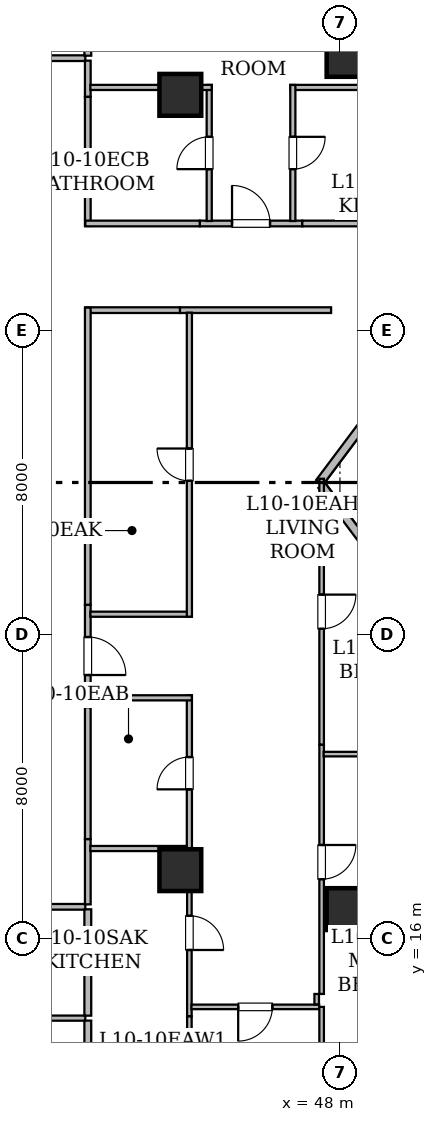
"""IFC4 building model, lengths in metres.
Left out: names, types, materials, properties, quantities, classifications, styles, units other than length and angle.
Written with IfcOpenShell. Run it as: python <this file> out.ifc"""

import sys

from ifc_helpers import new_model, si_unit, direction, frame, frame_2d, origin, origin_2d, place, context, subcontext, project, spatial, rectangle, hollow_rectangle, extrude, element, fill, save


model = new_model("IFC4")
c1 = context("Model", 3, precision=1e-05, world=origin(), true_north=direction((0.0, 1.0)))
c2 = subcontext(c1, "Body", "Model", "MODEL_VIEW")
j1 = project(units=[si_unit("LENGTHUNIT", "METRE"), si_unit("PLANEANGLEUNIT", "RADIAN")], contexts=[c1])
p1 = place(None, origin())
s1 = spatial("IfcSite", under=j1, at=p1, CompositionType="ELEMENT")
p2 = place(p1, origin())
s2 = spatial("IfcBuilding", under=s1, at=p2, CompositionType="ELEMENT")
p3 = place(p2, frame((0.0, 0.0, 44.25)))
s3 = spatial("IfcBuildingStorey", under=s2, at=p3, CompositionType="ELEMENT", Elevation=44.25)
for number, where, z_axis, x_axis in (
    (1, (48.2, 16.775, 0.0), (0.0, 0.0, 1.0), (1.0, 0.0, 0.0)),
    (2, (48.2, 39.225, 0.0), (0.0, 0.0, 1.0), (1.0, 0.0, 0.0)),
    (3, (43.8, 17.8, 0.0), (0.0, 0.0, 1.0), (1.0, 0.0, 0.0)),
    (4, (43.8, 38.2, 0.0), (0.0, 0.0, 1.0), (1.0, 0.0, 0.0)),
):
    element("IfcColumn", number, at=place(p3, frame(where, z_axis=z_axis, x_axis=x_axis)), inside=s3, PredefinedType="COLUMN", context=c2, shape_type="SweptSolid", body=[
        extrude(hollow_rectangle(XDim=1.1, YDim=1.1, WallThickness=0.055, at=origin_2d()), origin(), (0.0, 0.0, 1.0), 3.65),
    ])
p4 = place(p3, frame((49.856, 31.191, 0.0), z_axis=(0.0, 0.0, 1.0), x_axis=(-0.600137081448, -0.799897170561, 0.0)))
e5 = element("IfcWall", 5, at=p4, inside=s3, PredefinedType="STANDARD", context=c2, shape_type="SweptSolid", body=[
    extrude(rectangle(XDim=3.989, YDim=0.22, at=frame_2d((1.995, 0.0))), origin(), (0.0, 0.0, 1.0), 3.43),
])
p5 = place(p3, frame((47.519, 27.923, 0.0), z_axis=(0.0, 0.0, 1.0), x_axis=(0.600118645218, -0.799911002338, 0.0)))
e6 = element("IfcWall", 6, at=p5, inside=s3, PredefinedType="STANDARD", context=c2, shape_type="SweptSolid", body=[
    extrude(rectangle(XDim=3.951, YDim=0.22, at=frame_2d((1.975, 0.0))), origin(), (0.0, 0.0, 1.0), 3.43),
])
p6 = place(p3, frame((41.3, 16.835, 0.0), z_axis=(0.0, 0.0, 1.0), x_axis=(-1.0, 0.0, 0.0)))
e7 = element("IfcWall", 7, at=p6, inside=s3, PredefinedType="STANDARD", context=c2, shape_type="SweptSolid", body=[
    extrude(rectangle(XDim=2.336, YDim=0.15, at=frame_2d((1.168, 0.0))), origin(), (0.0, 0.0, 1.0), 3.43),
])
p7 = place(p3, frame((34.299, 39.165, 0.0), z_axis=(0.0, 0.0, 1.0), x_axis=(1.0, 0.0, 0.0)))
e8 = element("IfcWall", 8, at=p7, inside=s3, PredefinedType="STANDARD", context=c2, shape_type="SweptSolid", body=[
    extrude(rectangle(XDim=7.001, YDim=0.15, at=frame_2d((3.5, 0.0))), origin(), (0.0, 0.0, 1.0), 3.43),
])
p8 = place(p3, frame((41.365, 18.618, 0.0), z_axis=(0.0, 0.0, 1.0), x_axis=(0.0, -1.0, 0.0)))
e9 = element("IfcWall", 9, at=p8, inside=s3, PredefinedType="STANDARD", context=c2, shape_type="SweptSolid", body=[
    extrude(rectangle(XDim=1.718, YDim=0.15, at=frame_2d((0.859, 0.0))), origin(), (0.0, 0.0, 1.0), 2.647),
])
p9 = place(p3, frame((47.767, 32.535, 0.0), z_axis=(0.0, 0.0, 1.0), x_axis=(-1.0, 0.0, 0.0)))
e10 = element("IfcWall", 10, at=p9, inside=s3, PredefinedType="STANDARD", context=c2, shape_type="SweptSolid", body=[
    extrude(rectangle(XDim=3.978, YDim=0.15, at=frame_2d((1.989, 0.0))), origin(), (0.0, 0.0, 1.0), 2.647),
])
p10 = place(p3, frame((41.365, 24.783, 0.0), z_axis=(0.0, 0.0, 1.0), x_axis=(0.0, -1.0, 0.0)))
e11 = element("IfcWall", 11, at=p10, inside=s3, PredefinedType="STANDARD", context=c2, shape_type="SweptSolid", body=[
    extrude(rectangle(XDim=2.698, YDim=0.15, at=frame_2d((1.349, 0.0))), origin(), (0.0, 0.0, 1.0), 2.957),
])
p11 = place(p10, frame((0.849, 0.0, 0.0)))
e12 = element("IfcOpeningElement", 12, at=p11, cuts=e11, PredefinedType="OPENING", context=c2, shape_type="SweptSolid", body=[
    extrude(rectangle(XDim=1.0, YDim=2.15, at=frame_2d((0.5, 1.075))), frame((0.0, 0.085, 0.0), z_axis=(0.0, -1.0, 0.0), x_axis=(1.0, 0.0, 0.0)), (0.0, 0.0, 1.0), 0.17),
])
p12 = place(p3, frame((41.365, 22.085, 0.0), z_axis=(0.0, 0.0, 1.0), x_axis=(0.0, -1.0, 0.0)))
e13 = element("IfcWall", 13, at=p12, inside=s3, PredefinedType="STANDARD", context=c2, shape_type="SweptSolid", body=[
    extrude(rectangle(XDim=3.467, YDim=0.15, at=frame_2d((1.733, 0.0))), origin(), (0.0, 0.0, 1.0), 2.647),
])
p13 = place(p3, frame((43.789, 32.535, 0.0), z_axis=(0.0, 0.0, 1.0), x_axis=(-1.0, 0.0, 0.0)))
e14 = element("IfcWall", 14, at=p13, inside=s3, PredefinedType="STANDARD", context=c2, shape_type="SweptSolid", body=[
    extrude(rectangle(XDim=2.489, YDim=0.15, at=frame_2d((1.245, 0.0))), origin(), (0.0, 0.0, 1.0), 2.647),
])
p14 = place(p3, frame((41.365, 32.6, 0.0), z_axis=(0.0, 0.0, 1.0), x_axis=(0.0, -1.0, 0.0)))
e15 = element("IfcWall", 15, at=p14, inside=s3, PredefinedType="STANDARD", context=c2, shape_type="SweptSolid", body=[
    extrude(rectangle(XDim=7.817, YDim=0.15, at=frame_2d((3.909, 0.0))), origin(), (0.0, 0.0, 1.0), 3.43),
])
p15 = place(p3, frame((41.365, 39.1, 0.0), z_axis=(0.0, 0.0, 1.0), x_axis=(0.0, -1.0, 0.0)))
e16 = element("IfcWall", 16, at=p15, inside=s3, PredefinedType="STANDARD", context=c2, shape_type="SweptSolid", body=[
    extrude(rectangle(XDim=0.954, YDim=0.15, at=frame_2d((0.477, 0.0))), origin(), (0.0, 0.0, 1.0), 3.43),
])
p16 = place(p3, frame((44.311, 34.815, 0.0), z_axis=(0.0, 0.0, 1.0), x_axis=(1.0, 0.0, 0.0)))
e17 = element("IfcWall", 17, at=p16, inside=s3, PredefinedType="STANDARD", context=c2, shape_type="SweptSolid", body=[
    extrude(rectangle(XDim=2.698, YDim=0.15, at=frame_2d((1.349, 0.0))), origin(), (0.0, 0.0, 1.0), 3.43),
])
p17 = place(p16, frame((0.849, 0.0, 0.0)))
e18 = element("IfcOpeningElement", 18, at=p17, cuts=e17, PredefinedType="OPENING", context=c2, shape_type="SweptSolid", body=[
    extrude(rectangle(XDim=1.0, YDim=2.15, at=frame_2d((0.5, 1.075))), frame((0.0, 0.085, 0.0), z_axis=(0.0, -1.0, 0.0), x_axis=(1.0, 0.0, 0.0)), (0.0, 0.0, 1.0), 0.17),
])
p18 = place(p3, frame((41.365, 38.146, 0.0), z_axis=(0.0, 0.0, 1.0), x_axis=(0.0, -1.0, 0.0)))
e19 = element("IfcWall", 19, at=p18, inside=s3, PredefinedType="STANDARD", context=c2, shape_type="SweptSolid", body=[
    extrude(rectangle(XDim=3.396, YDim=0.15, at=frame_2d((1.698, 0.0))), origin(), (0.0, 0.0, 1.0), 2.647),
])
p19 = place(p3, frame((41.3, 34.815, 0.0), z_axis=(0.0, 0.0, 1.0), x_axis=(1.0, 0.0, 0.0)))
e20 = element("IfcWall", 20, at=p19, inside=s3, PredefinedType="STANDARD", context=c2, shape_type="SweptSolid", body=[
    extrude(rectangle(XDim=3.011, YDim=0.15, at=frame_2d((1.505, 0.0))), origin(), (0.0, 0.0, 1.0), 2.647),
])
p20 = place(p3, frame((47.009, 34.815, 0.0), z_axis=(0.0, 0.0, 1.0), x_axis=(1.0, 0.0, 0.0)))
e21 = element("IfcWall", 21, at=p20, inside=s3, PredefinedType="STANDARD", context=c2, shape_type="SweptSolid", body=[
    extrude(rectangle(XDim=2.779, YDim=0.15, at=frame_2d((1.39, 0.0))), origin(), (0.0, 0.0, 1.0), 2.803),
])
p21 = place(p3, frame((38.65, 13.906, 0.0), z_axis=(0.0, 0.0, 1.0), x_axis=(1.0, 0.0, 0.0)))
e22 = element("IfcWall", 22, at=p21, inside=s3, PredefinedType="PARTITIONING", context=c2, shape_type="SweptSolid", body=[
    extrude(rectangle(XDim=2.65, YDim=0.135, at=frame_2d((1.325, 0.0))), origin(), (0.0, 0.0, 1.0), 3.43),
])
p22 = place(p3, frame((41.365, 13.841, 0.0), z_axis=(0.0, 0.0, 1.0), x_axis=(0.0, -1.0, 0.0)))
e23 = element("IfcWall", 23, at=p22, inside=s3, PredefinedType="STANDARD", context=c2, shape_type="SweptSolid", body=[
    extrude(rectangle(XDim=1.45, YDim=0.18, at=frame_2d((0.725, 0.0))), origin(), (0.0, 0.0, 1.0), 3.43),
])
p23 = place(p3, frame((41.365, 16.77, 0.0), z_axis=(0.0, 0.0, 1.0), x_axis=(0.0, -1.0, 0.0)))
e24 = element("IfcWall", 24, at=p23, inside=s3, PredefinedType="STANDARD", context=c2, shape_type="SweptSolid", body=[
    extrude(rectangle(XDim=2.799, YDim=0.18, at=frame_2d((1.399, 0.0))), origin(), (0.0, 0.0, 1.0), 3.43),
])
p24 = place(p3, frame((41.365, 41.024, 0.0), z_axis=(0.0, 0.0, 1.0), x_axis=(0.0, -1.0, 0.0)))
e25 = element("IfcWall", 25, at=p24, inside=s3, PredefinedType="STANDARD", context=c2, shape_type="SweptSolid", body=[
    extrude(rectangle(XDim=1.794, YDim=0.18, at=frame_2d((0.897, 0.0))), origin(), (0.0, 0.0, 1.0), 3.43),
])
p25 = place(p3, frame((44.038, 18.304, 0.0), z_axis=(0.0, 0.0, 1.0), x_axis=(0.0, -1.0, 0.0)))
e26 = element("IfcWall", 26, at=p25, inside=s3, PredefinedType="PARTITIONING", context=c2, shape_type="SweptSolid", body=[
    extrude(rectangle(XDim=4.351, YDim=0.12, at=frame_2d((2.176, 0.0))), origin(), (0.0, 0.0, 1.0), 2.647),
])
p26 = place(p25, frame((1.705, 0.0, 0.0)))
e27 = element("IfcOpeningElement", 27, at=p26, cuts=e26, PredefinedType="OPENING", context=c2, shape_type="SweptSolid", body=[
    extrude(rectangle(XDim=0.9, YDim=2.1, at=frame_2d((0.45, 1.05))), frame((0.0, 0.07, 0.0), z_axis=(0.0, -1.0, 0.0), x_axis=(1.0, 0.0, 0.0)), (0.0, 0.0, 1.0), 0.14),
])
p27 = place(p3, frame((44.038, 13.953, 0.0), z_axis=(0.0, 0.0, 1.0), x_axis=(0.0, -1.0, 0.0)))
e28 = element("IfcWall", 28, at=p27, inside=s3, PredefinedType="PARTITIONING", context=c2, shape_type="SweptSolid", body=[
    extrude(rectangle(XDim=10.741, YDim=0.12, at=frame_2d((5.371, 0.0))), origin(), (0.0, 0.0, 1.0), 2.647),
])
p28 = place(p27, frame((4.92, 0.0, 0.0)))
e29 = element("IfcOpeningElement", 29, at=p28, cuts=e28, PredefinedType="OPENING", context=c2, shape_type="SweptSolid", body=[
    extrude(rectangle(XDim=0.9, YDim=2.1, at=frame_2d((0.45, 1.05))), frame((0.0, 0.07, 0.0), z_axis=(0.0, -1.0, 0.0), x_axis=(1.0, 0.0, 0.0)), (0.0, 0.0, 1.0), 0.14),
])
p29 = place(p3, frame((41.432, 18.369, 0.0), z_axis=(0.0, 0.0, 1.0), x_axis=(1.0, 0.0, 0.0)))
e30 = element("IfcWall", 30, at=p29, inside=s3, PredefinedType="PARTITIONING", context=c2, shape_type="SweptSolid", body=[
    extrude(rectangle(XDim=2.541, YDim=0.135, at=frame_2d((1.271, 0.0))), origin(), (0.0, 0.0, 1.0), 2.647),
])
p30 = place(p3, frame((47.453, 14.202, 0.0), z_axis=(0.0, 0.0, 1.0), x_axis=(-1.0, 0.0, 0.0)))
e31 = element("IfcWall", 31, at=p30, inside=s3, PredefinedType="PARTITIONING", context=c2, shape_type="SweptSolid", body=[
    extrude(rectangle(XDim=3.361, YDim=0.12, at=frame_2d((1.68, 0.0))), origin(), (0.0, 0.0, 1.0), 2.647),
])
p31 = place(p30, frame((1.231, 0.0, 0.0)))
e32 = element("IfcOpeningElement", 32, at=p31, cuts=e31, PredefinedType="OPENING", context=c2, shape_type="SweptSolid", body=[
    extrude(rectangle(XDim=0.9, YDim=2.1, at=frame_2d((0.45, 1.05))), frame((0.0, 0.07, 0.0), z_axis=(0.0, -1.0, 0.0), x_axis=(1.0, 0.0, 0.0)), (0.0, 0.0, 1.0), 0.14),
])
p32 = place(p3, frame((47.388, 14.542, 0.0), z_axis=(0.0, 0.0, 1.0), x_axis=(0.0, -1.0, 0.0)))
e33 = element("IfcWall", 33, at=p32, inside=s3, PredefinedType="PARTITIONING", context=c2, shape_type="SweptSolid", body=[
    extrude(rectangle(XDim=0.275, YDim=0.12, at=frame_2d((0.137, 0.0))), origin(), (0.0, 0.0, 1.0), 2.803),
])
p33 = place(p3, frame((44.038, 18.304, 0.0), z_axis=(0.0, 0.0, 1.0), x_axis=(0.0, 1.0, 0.0)))
e34 = element("IfcWall", 34, at=p33, inside=s3, PredefinedType="PARTITIONING", context=c2, shape_type="SweptSolid", body=[
    extrude(rectangle(XDim=4.095, YDim=0.135, at=frame_2d((2.047, 0.0))), origin(), (0.0, 0.0, 1.0), 2.647),
])
p34 = place(p33, frame((1.622, 0.0, 0.0)))
e35 = element("IfcOpeningElement", 35, at=p34, cuts=e34, PredefinedType="OPENING", context=c2, shape_type="SweptSolid", body=[
    extrude(rectangle(XDim=0.85, YDim=2.1, at=frame_2d((0.425, 1.05))), frame((0.0, 0.077, 0.0), z_axis=(0.0, -1.0, 0.0), x_axis=(1.0, 0.0, 0.0)), (0.0, 0.0, 1.0), 0.155),
])
for number, where, z_axis, x_axis in (
    (36, (44.103, 22.334, 0.0), (0.0, 0.0, 1.0), (-1.0, 0.0, 0.0)),
    (37, (41.432, 24.534, 0.0), (0.0, 0.0, 1.0), (1.0, 0.0, 0.0)),
):
    element("IfcWall", number, at=place(p3, frame(where, z_axis=z_axis, x_axis=x_axis)), inside=s3, PredefinedType="PARTITIONING", context=c2, shape_type="SweptSolid", body=[
        extrude(rectangle(XDim=2.671, YDim=0.135, at=frame_2d((1.335, 0.0))), origin(), (0.0, 0.0, 1.0), 2.647),
    ])
p35 = place(p3, frame((44.038, 24.469, 0.0), z_axis=(0.0, 0.0, 1.0), x_axis=(0.0, 1.0, 0.0)))
e38 = element("IfcWall", 38, at=p35, inside=s3, PredefinedType="PARTITIONING", context=c2, shape_type="SweptSolid", body=[
    extrude(rectangle(XDim=7.999, YDim=0.135, at=frame_2d((4.0, 0.0))), origin(), (0.0, 0.0, 1.0), 2.647),
])
p36 = place(p35, frame((3.575, 0.0, 0.0)))
e39 = element("IfcOpeningElement", 39, at=p36, cuts=e38, PredefinedType="OPENING", context=c2, shape_type="SweptSolid", body=[
    extrude(rectangle(XDim=0.85, YDim=2.1, at=frame_2d((0.425, 1.05))), frame((0.0, 0.077, 0.0), z_axis=(0.0, -1.0, 0.0), x_axis=(1.0, 0.0, 0.0)), (0.0, 0.0, 1.0), 0.155),
])
p37 = place(p3, frame((47.518, 21.102, 0.0), z_axis=(0.0, 0.0, 1.0), x_axis=(0.0, -1.0, 0.0)))
e40 = element("IfcWall", 40, at=p37, inside=s3, PredefinedType="PARTITIONING", context=c2, shape_type="SweptSolid", body=[
    extrude(rectangle(XDim=6.56, YDim=0.12, at=frame_2d((3.28, 0.0))), origin(), (0.0, 0.0, 1.0), 2.647),
])
p38 = place(p37, frame((2.64, 0.0, 0.0)))
e41 = element("IfcOpeningElement", 41, at=p38, cuts=e40, PredefinedType="OPENING", context=c2, shape_type="SweptSolid", body=[
    extrude(rectangle(XDim=0.9, YDim=2.1, at=frame_2d((0.45, 1.05))), frame((0.0, 0.07, 0.0), z_axis=(0.0, -1.0, 0.0), x_axis=(1.0, 0.0, 0.0)), (0.0, 0.0, 1.0), 0.14),
])
p39 = place(p3, frame((47.518, 28.098, 0.0), z_axis=(0.0, 0.0, 1.0), x_axis=(0.0, -1.0, 0.0)))
e42 = element("IfcWall", 42, at=p39, inside=s3, PredefinedType="PARTITIONING", context=c2, shape_type="SweptSolid", body=[
    extrude(rectangle(XDim=6.996, YDim=0.12, at=frame_2d((3.498, 0.0))), origin(), (0.0, 0.0, 1.0), 2.957),
])
p40 = place(p39, frame((3.048, 0.0, 0.0)))
e43 = element("IfcOpeningElement", 43, at=p40, cuts=e42, PredefinedType="OPENING", context=c2, shape_type="SweptSolid", body=[
    extrude(rectangle(XDim=0.9, YDim=2.1, at=frame_2d((0.45, 1.05))), frame((0.0, 0.07, 0.0), z_axis=(0.0, -1.0, 0.0), x_axis=(1.0, 0.0, 0.0)), (0.0, 0.0, 1.0), 0.14),
])
p41 = place(p3, frame((47.518, 14.202, 0.0), z_axis=(0.0, 0.0, 1.0), x_axis=(0.0, -1.0, 0.0)))
e44 = element("IfcWall", 44, at=p41, inside=s3, PredefinedType="PARTITIONING", context=c2, shape_type="SweptSolid", body=[
    extrude(rectangle(XDim=2.886, YDim=0.12, at=frame_2d((1.443, 0.0))), origin(), (0.0, 0.0, 1.0), 2.803),
])
p42 = place(p41, frame((0.993, 0.0, 0.0)))
e45 = element("IfcOpeningElement", 45, at=p42, cuts=e44, PredefinedType="OPENING", context=c2, shape_type="SweptSolid", body=[
    extrude(rectangle(XDim=0.9, YDim=2.1, at=frame_2d((0.45, 1.05))), frame((0.0, 0.07, 0.0), z_axis=(0.0, -1.0, 0.0), x_axis=(1.0, 0.0, 0.0)), (0.0, 0.0, 1.0), 0.14),
])
p43 = place(p3, frame((47.572, 20.853, 0.0), z_axis=(0.0, 0.0, 1.0), x_axis=(1.0, 0.0, 0.0)))
e46 = element("IfcWall", 46, at=p43, inside=s3, PredefinedType="PARTITIONING", context=c2, shape_type="SweptSolid", body=[
    extrude(rectangle(XDim=2.216, YDim=0.12, at=frame_2d((1.108, 0.0))), origin(), (0.0, 0.0, 1.0), 2.803),
])
p44 = place(p3, frame((44.56, 34.88, 0.0), z_axis=(0.0, 0.0, 1.0), x_axis=(0.0, 1.0, 0.0)))
e47 = element("IfcWall", 47, at=p44, inside=s3, PredefinedType="PARTITIONING", context=c2, shape_type="SweptSolid", body=[
    extrude(rectangle(XDim=3.58, YDim=0.135, at=frame_2d((1.79, 0.0))), origin(), (0.0, 0.0, 1.0), 2.647),
])
p45 = place(p44, frame((1.365, 0.0, 0.0)))
e48 = element("IfcOpeningElement", 48, at=p45, cuts=e47, PredefinedType="OPENING", context=c2, shape_type="SweptSolid", body=[
    extrude(rectangle(XDim=0.85, YDim=2.1, at=frame_2d((0.425, 1.05))), frame((0.0, 0.077, 0.0), z_axis=(0.0, -1.0, 0.0), x_axis=(1.0, 0.0, 0.0)), (0.0, 0.0, 1.0), 0.155),
])
p46 = place(p3, frame((44.625, 38.395, 0.0), z_axis=(0.0, 0.0, 1.0), x_axis=(-1.0, 0.0, 0.0)))
e49 = element("IfcWall", 49, at=p46, inside=s3, PredefinedType="PARTITIONING", context=c2, shape_type="SweptSolid", body=[
    extrude(rectangle(XDim=3.193, YDim=0.135, at=frame_2d((1.597, 0.0))), origin(), (0.0, 0.0, 1.0), 2.647),
])
p47 = place(p3, frame((49.788, 38.395, 0.0), z_axis=(0.0, 0.0, 1.0), x_axis=(-1.0, 0.0, 0.0)))
e50 = element("IfcWall", 50, at=p47, inside=s3, PredefinedType="PARTITIONING", context=c2, shape_type="SweptSolid", body=[
    extrude(rectangle(XDim=3.093, YDim=0.135, at=frame_2d((1.546, 0.0))), origin(), (0.0, 0.0, 1.0), 2.803),
])
p48 = place(p3, frame((46.76, 38.46, 0.0), z_axis=(0.0, 0.0, 1.0), x_axis=(0.0, -1.0, 0.0)))
e51 = element("IfcWall", 51, at=p48, inside=s3, PredefinedType="PARTITIONING", context=c2, shape_type="SweptSolid", body=[
    extrude(rectangle(XDim=3.58, YDim=0.135, at=frame_2d((1.79, 0.0))), origin(), (0.0, 0.0, 1.0), 3.43),
])
p49 = place(p48, frame((1.365, 0.0, 0.0)))
e52 = element("IfcOpeningElement", 52, at=p49, cuts=e51, PredefinedType="OPENING", context=c2, shape_type="SweptSolid", body=[
    extrude(rectangle(XDim=0.85, YDim=2.1, at=frame_2d((0.425, 1.05))), frame((0.0, 0.077, 0.0), z_axis=(0.0, -1.0, 0.0), x_axis=(1.0, 0.0, 0.0)), (0.0, 0.0, 1.0), 0.155),
])
p50 = place(p11, origin())
e53 = element("IfcDoor", 53, at=p50, inside=s3, OperationType="SINGLE_SWING_RIGHT", PredefinedType="DOOR", context=c2, shape_type="SweptSolid", body=[
    extrude(rectangle(XDim=1.0, YDim=2.15, at=frame_2d((0.5, 1.075))), frame((0.0, 0.025, 0.0), z_axis=(0.0, -1.0, 0.0), x_axis=(1.0, 0.0, 0.0)), (0.0, 0.0, 1.0), 0.05),
])
fill(e12, e53)
p51 = place(p17, origin())
e54 = element("IfcDoor", 54, at=p51, inside=s3, OperationType="SINGLE_SWING_LEFT", PredefinedType="DOOR", context=c2, shape_type="SweptSolid", body=[
    extrude(rectangle(XDim=1.0, YDim=2.15, at=frame_2d((0.5, 1.075))), frame((0.0, 0.025, 0.0), z_axis=(0.0, -1.0, 0.0), x_axis=(1.0, 0.0, 0.0)), (0.0, 0.0, 1.0), 0.05),
])
fill(e18, e54)
p52 = place(p26, origin())
e55 = element("IfcDoor", 55, at=p52, inside=s3, OperationType="SINGLE_SWING_RIGHT", PredefinedType="DOOR", context=c2, shape_type="SweptSolid", body=[
    extrude(rectangle(XDim=0.9, YDim=2.1, at=frame_2d((0.45, 1.05))), frame((0.0, 0.025, 0.0), z_axis=(0.0, -1.0, 0.0), x_axis=(1.0, 0.0, 0.0)), (0.0, 0.0, 1.0), 0.05),
])
fill(e27, e55)
p53 = place(p31, origin())
e56 = element("IfcDoor", 56, at=p53, inside=s3, OperationType="SINGLE_SWING_RIGHT", PredefinedType="DOOR", context=c2, shape_type="SweptSolid", body=[
    extrude(rectangle(XDim=0.9, YDim=2.1, at=frame_2d((0.45, 1.05))), frame((0.0, 0.025, 0.0), z_axis=(0.0, -1.0, 0.0), x_axis=(1.0, 0.0, 0.0)), (0.0, 0.0, 1.0), 0.05),
])
fill(e32, e56)
p54 = place(p34, origin())
e57 = element("IfcDoor", 57, at=p54, inside=s3, OperationType="SINGLE_SWING_LEFT", PredefinedType="DOOR", context=c2, shape_type="SweptSolid", body=[
    extrude(rectangle(XDim=0.85, YDim=2.1, at=frame_2d((0.425, 1.05))), frame((0.0, 0.025, 0.0), z_axis=(0.0, -1.0, 0.0), x_axis=(1.0, 0.0, 0.0)), (0.0, 0.0, 1.0), 0.05),
])
fill(e35, e57)
p55 = place(p36, origin())
e58 = element("IfcDoor", 58, at=p55, inside=s3, OperationType="SINGLE_SWING_RIGHT", PredefinedType="DOOR", context=c2, shape_type="SweptSolid", body=[
    extrude(rectangle(XDim=0.85, YDim=2.1, at=frame_2d((0.425, 1.05))), frame((0.0, 0.025, 0.0), z_axis=(0.0, -1.0, 0.0), x_axis=(1.0, 0.0, 0.0)), (0.0, 0.0, 1.0), 0.05),
])
fill(e39, e58)
p56 = place(p38, origin())
e59 = element("IfcDoor", 59, at=p56, inside=s3, OperationType="SINGLE_SWING_LEFT", PredefinedType="DOOR", context=c2, shape_type="SweptSolid", body=[
    extrude(rectangle(XDim=0.9, YDim=2.1, at=frame_2d((0.45, 1.05))), frame((0.0, 0.025, 0.0), z_axis=(0.0, -1.0, 0.0), x_axis=(1.0, 0.0, 0.0)), (0.0, 0.0, 1.0), 0.05),
])
fill(e41, e59)
p57 = place(p40, origin())
e60 = element("IfcDoor", 60, at=p57, inside=s3, OperationType="SINGLE_SWING_LEFT", PredefinedType="DOOR", context=c2, shape_type="SweptSolid", body=[
    extrude(rectangle(XDim=0.9, YDim=2.1, at=frame_2d((0.45, 1.05))), frame((0.0, 0.025, 0.0), z_axis=(0.0, -1.0, 0.0), x_axis=(1.0, 0.0, 0.0)), (0.0, 0.0, 1.0), 0.05),
])
fill(e43, e60)
p58 = place(p45, origin())
e61 = element("IfcDoor", 61, at=p58, inside=s3, OperationType="SINGLE_SWING_LEFT", PredefinedType="DOOR", context=c2, shape_type="SweptSolid", body=[
    extrude(rectangle(XDim=0.85, YDim=2.1, at=frame_2d((0.425, 1.05))), frame((0.0, 0.025, 0.0), z_axis=(0.0, -1.0, 0.0), x_axis=(1.0, 0.0, 0.0)), (0.0, 0.0, 1.0), 0.05),
])
fill(e48, e61)
p59 = place(p49, origin())
e62 = element("IfcDoor", 62, at=p59, inside=s3, OperationType="SINGLE_SWING_LEFT", PredefinedType="DOOR", context=c2, shape_type="SweptSolid", body=[
    extrude(rectangle(XDim=0.85, YDim=2.1, at=frame_2d((0.425, 1.05))), frame((0.0, 0.025, 0.0), z_axis=(0.0, -1.0, 0.0), x_axis=(1.0, 0.0, 0.0)), (0.0, 0.0, 1.0), 0.05),
])
fill(e52, e62)
save(model, sys.argv[1])
